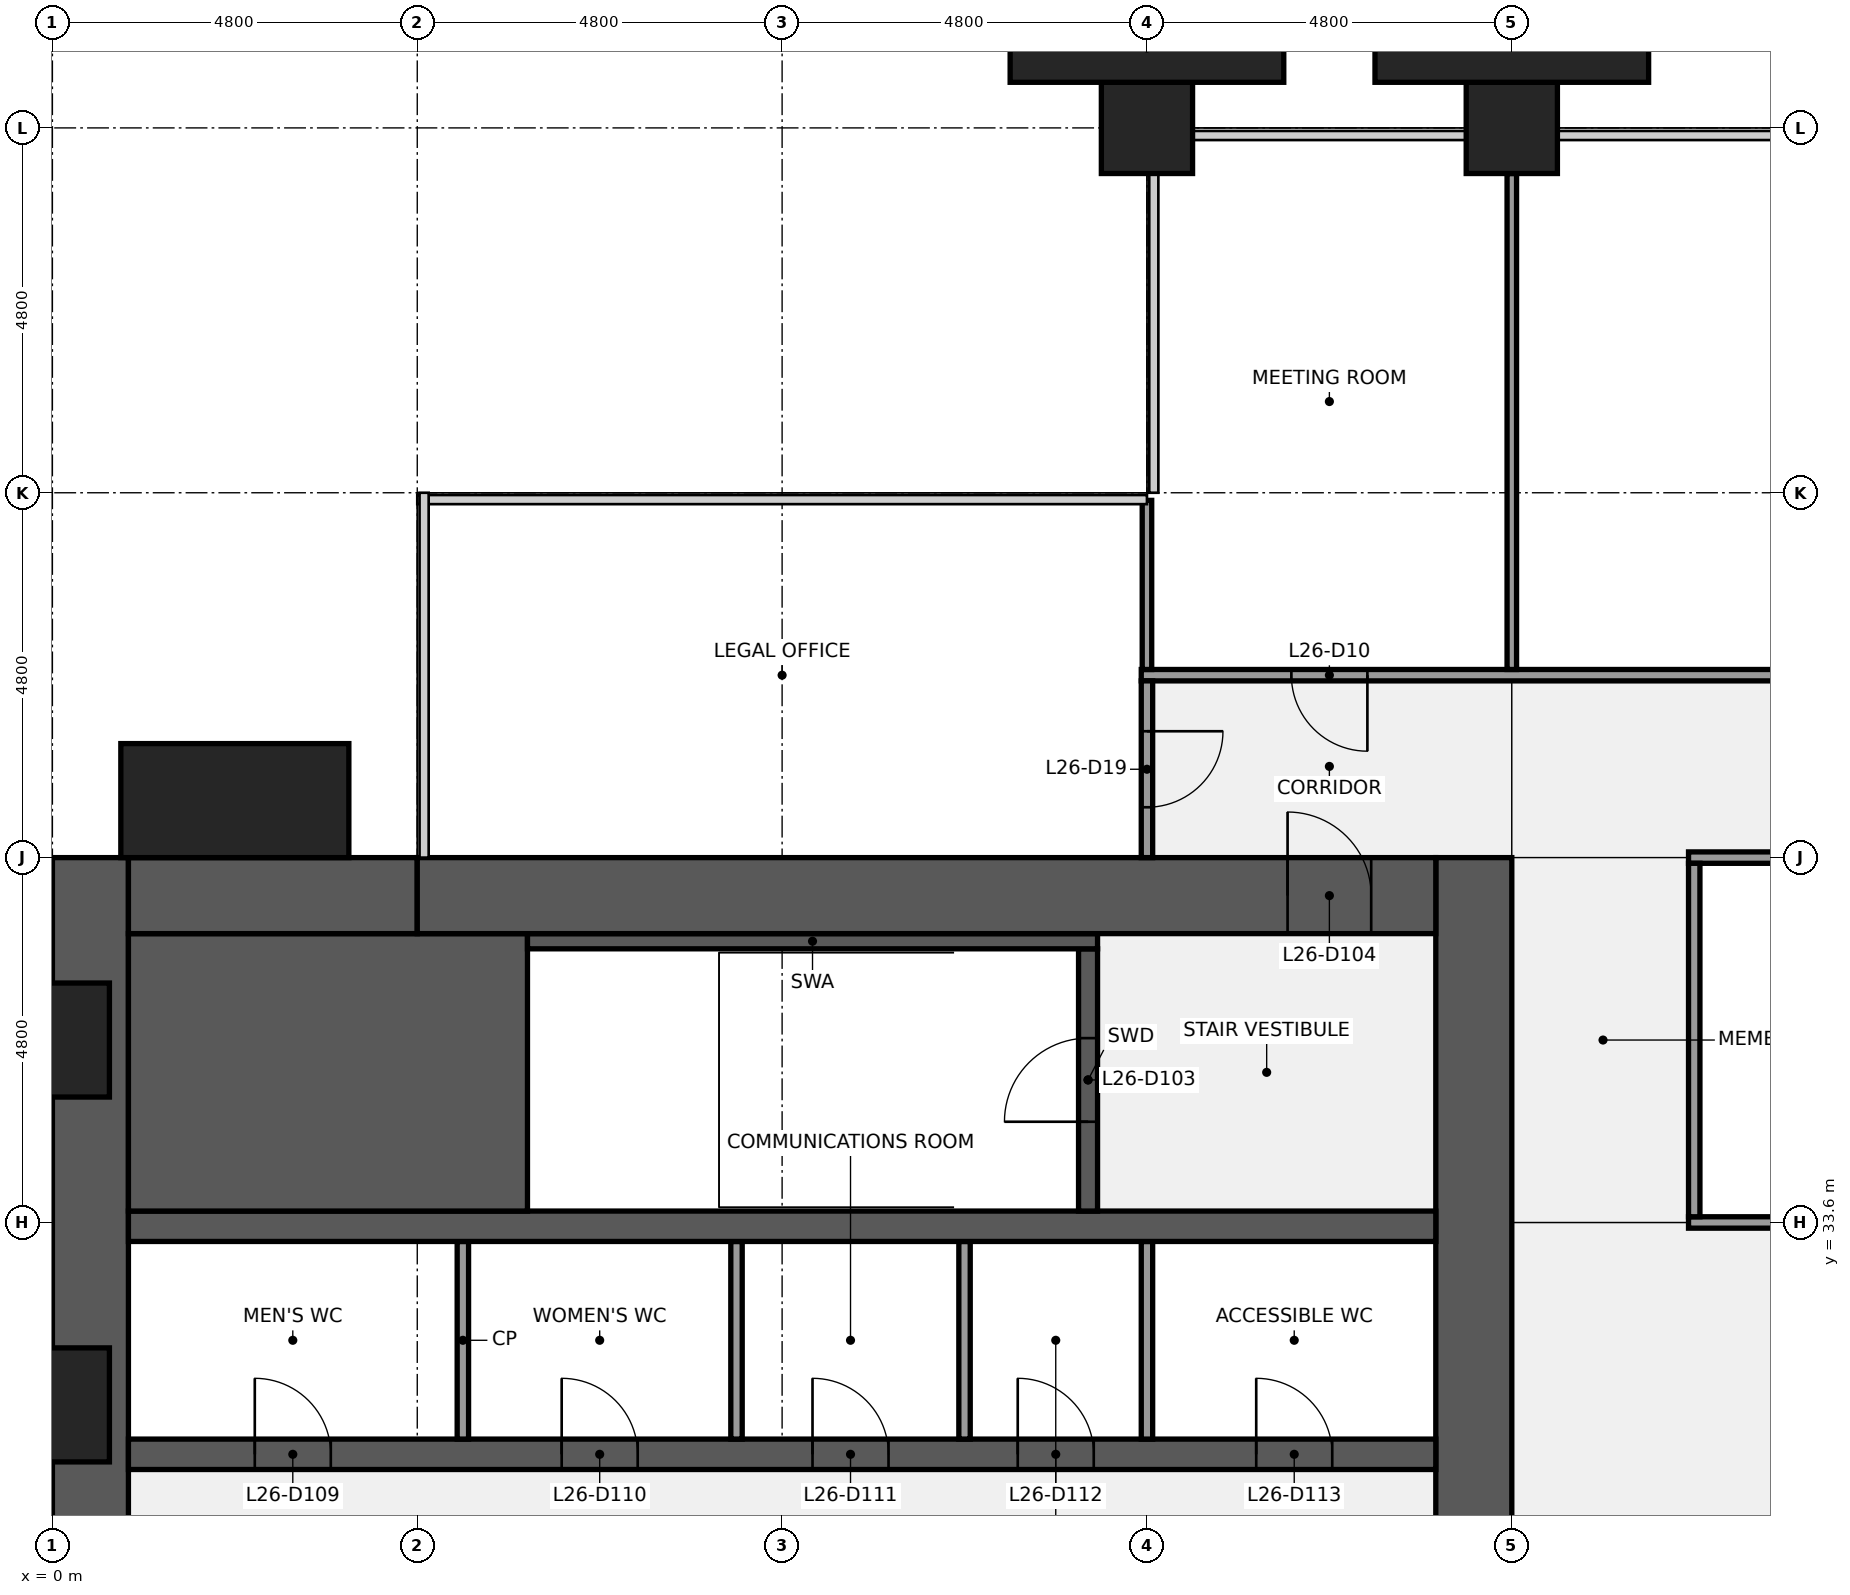
"""IFC4 building model, lengths in metres.
Left out: names, types, materials, properties, quantities, classifications, styles, units other than length and angle.
Written with IfcOpenShell. Run it as: python <this file> out.ifc"""

import sys

from ifc_helpers import new_model, si_unit, direction, frame, frame_2d, origin, origin_2d, place, context, subcontext, project, spatial, rectangle, extrude, element, fill, save


model = new_model("IFC4")
c1 = context("Model", 3, precision=1e-05, world=origin(), true_north=direction((0.0, 1.0)))
c2 = subcontext(c1, "Body", "Model", "MODEL_VIEW")
j1 = project(units=[si_unit("LENGTHUNIT", "METRE"), si_unit("PLANEANGLEUNIT", "RADIAN")], contexts=[c1])
p1 = place(None, origin())
s1 = spatial("IfcSite", under=j1, at=p1, CompositionType="ELEMENT")
p2 = place(p1, origin())
s2 = spatial("IfcBuilding", under=s1, at=p2, CompositionType="ELEMENT")
p3 = place(p2, frame((0.0, 0.0, 124.1)))
s3 = spatial("IfcBuildingStorey", under=s2, at=p3, CompositionType="ELEMENT", Elevation=124.1)
for number, where, z_axis, x_axis in (
    (1, (14.4, 48.0, 0.0), (0.0, 0.0, 1.0), (1.0, 0.0, 0.0)),
    (2, (19.2, 48.0, 0.0), (0.0, 0.0, 1.0), (1.0, 0.0, 0.0)),
):
    element("IfcColumn", number, at=place(p3, frame(where, z_axis=z_axis, x_axis=x_axis)), inside=s3, PredefinedType="COLUMN", context=c2, shape_type="SweptSolid", body=[
        extrude(rectangle(XDim=1.2, YDim=1.2, at=origin_2d()), origin(), (0.0, 0.0, 1.0), 4.0),
    ])
p4 = place(p3, frame((0.5, 9.6, 0.0), z_axis=(0.0, 0.0, 1.0), x_axis=(0.0, 1.0, 0.0)))
e3 = element("IfcWall", 3, at=p4, inside=s3, PredefinedType="SHEAR", context=c2, shape_type="SweptSolid", body=[
    extrude(rectangle(XDim=28.8, YDim=1.0, at=frame_2d((14.4, 0.0))), origin(), (0.0, 0.0, 1.0), 3.84),
])
p5 = place(p4, frame((8.85, 0.0, 0.9)))
e4 = element("IfcOpeningElement", 4, at=p5, cuts=e3, PredefinedType="OPENING", context=c2, shape_type="SweptSolid", body=[
    extrude(rectangle(XDim=1.5, YDim=1.5, at=frame_2d((0.75, 0.75))), frame((0.0, 0.51, 0.0), z_axis=(0.0, -1.0, 0.0), x_axis=(1.0, 0.0, 0.0)), (0.0, 0.0, 1.0), 1.02),
])
p6 = place(p4, frame((18.45, 0.0, 0.9)))
e5 = element("IfcOpeningElement", 5, at=p6, cuts=e3, PredefinedType="OPENING", context=c2, shape_type="SweptSolid", body=[
    extrude(rectangle(XDim=1.5, YDim=1.5, at=frame_2d((0.75, 0.75))), frame((0.0, 0.51, 0.0), z_axis=(0.0, -1.0, 0.0), x_axis=(1.0, 0.0, 0.0)), (0.0, 0.0, 1.0), 1.02),
])
p7 = place(p3, frame((18.7, 38.4, 0.0), z_axis=(0.0, 0.0, 1.0), x_axis=(0.0, -1.0, 0.0)))
e6 = element("IfcWall", 6, at=p7, inside=s3, PredefinedType="SHEAR", context=c2, shape_type="SweptSolid", body=[
    extrude(rectangle(XDim=28.8, YDim=1.0, at=frame_2d((14.4, 0.0))), origin(), (0.0, 0.0, 1.0), 3.84),
])
p8 = place(p7, frame((18.3, 0.0, 0.0)))
e7 = element("IfcOpeningElement", 7, at=p8, cuts=e6, PredefinedType="OPENING", context=c2, shape_type="SweptSolid", body=[
    extrude(rectangle(XDim=1.8, YDim=2.1, at=frame_2d((0.9, 1.05))), frame((0.0, 0.51, 0.0), z_axis=(0.0, -1.0, 0.0), x_axis=(1.0, 0.0, 0.0)), (0.0, 0.0, 1.0), 1.02),
])
p9 = place(p7, frame((8.7, 0.0, 0.0)))
e8 = element("IfcOpeningElement", 8, at=p9, cuts=e6, PredefinedType="OPENING", context=c2, shape_type="SweptSolid", body=[
    extrude(rectangle(XDim=1.8, YDim=2.1, at=frame_2d((0.9, 1.05))), frame((0.0, 0.51, 0.0), z_axis=(0.0, -1.0, 0.0), x_axis=(1.0, 0.0, 0.0)), (0.0, 0.0, 1.0), 1.02),
])
p10 = place(p3, frame((1.0, 30.55, 0.0), z_axis=(0.0, 0.0, 1.0), x_axis=(1.0, 0.0, 0.0)))
e9 = element("IfcWall", 9, at=p10, inside=s3, PredefinedType="SHEAR", context=c2, shape_type="SweptSolid", body=[
    extrude(rectangle(XDim=17.2, YDim=0.4, at=frame_2d((8.6, 0.0))), origin(), (0.0, 0.0, 1.0), 3.84),
])
p11 = place(p10, frame((1.663, 0.0, 0.0)))
e10 = element("IfcOpeningElement", 10, at=p11, cuts=e9, PredefinedType="OPENING", context=c2, shape_type="SweptSolid", body=[
    extrude(rectangle(XDim=1.0, YDim=2.1, at=frame_2d((0.5, 1.05))), frame((0.0, 0.21, 0.0), z_axis=(0.0, -1.0, 0.0), x_axis=(1.0, 0.0, 0.0)), (0.0, 0.0, 1.0), 0.42),
])
p12 = place(p10, frame((5.7, 0.0, 0.0)))
e11 = element("IfcOpeningElement", 11, at=p12, cuts=e9, PredefinedType="OPENING", context=c2, shape_type="SweptSolid", body=[
    extrude(rectangle(XDim=1.0, YDim=2.1, at=frame_2d((0.5, 1.05))), frame((0.0, 0.21, 0.0), z_axis=(0.0, -1.0, 0.0), x_axis=(1.0, 0.0, 0.0)), (0.0, 0.0, 1.0), 0.42),
])
p13 = place(p10, frame((9.0, 0.0, 0.0)))
e12 = element("IfcOpeningElement", 12, at=p13, cuts=e9, PredefinedType="OPENING", context=c2, shape_type="SweptSolid", body=[
    extrude(rectangle(XDim=1.0, YDim=2.1, at=frame_2d((0.5, 1.05))), frame((0.0, 0.21, 0.0), z_axis=(0.0, -1.0, 0.0), x_axis=(1.0, 0.0, 0.0)), (0.0, 0.0, 1.0), 0.42),
])
p14 = place(p10, frame((11.7, 0.0, 0.0)))
e13 = element("IfcOpeningElement", 13, at=p14, cuts=e9, PredefinedType="OPENING", context=c2, shape_type="SweptSolid", body=[
    extrude(rectangle(XDim=1.0, YDim=2.1, at=frame_2d((0.5, 1.05))), frame((0.0, 0.21, 0.0), z_axis=(0.0, -1.0, 0.0), x_axis=(1.0, 0.0, 0.0)), (0.0, 0.0, 1.0), 0.42),
])
p15 = place(p10, frame((14.837, 0.0, 0.0)))
e14 = element("IfcOpeningElement", 14, at=p15, cuts=e9, PredefinedType="OPENING", context=c2, shape_type="SweptSolid", body=[
    extrude(rectangle(XDim=1.0, YDim=2.1, at=frame_2d((0.5, 1.05))), frame((0.0, 0.21, 0.0), z_axis=(0.0, -1.0, 0.0), x_axis=(1.0, 0.0, 0.0)), (0.0, 0.0, 1.0), 0.42),
])
for number, where, z_axis, x_axis in (
    (15, (5.4, 30.75, 0.0), (0.0, 0.0, 1.0), (0.0, 1.0, 0.0)),
    (16, (9.0, 30.75, 0.0), (0.0, 0.0, 1.0), (0.0, 1.0, 0.0)),
    (17, (12.0, 30.75, 0.0), (0.0, 0.0, 1.0), (0.0, 1.0, 0.0)),
    (18, (14.4, 30.75, 0.0), (0.0, 0.0, 1.0), (0.0, 1.0, 0.0)),
):
    element("IfcWall", number, at=place(p3, frame(where, z_axis=z_axis, x_axis=x_axis)), inside=s3, PredefinedType="PARTITIONING", context=c2, shape_type="SweptSolid", body=[
        extrude(rectangle(XDim=2.6, YDim=0.15, at=frame_2d((1.3, 0.0))), origin(), (0.0, 0.0, 1.0), 3.84),
    ])
p16 = place(p3, frame((1.0, 33.55, 0.0), z_axis=(0.0, 0.0, 1.0), x_axis=(1.0, 0.0, 0.0)))
e19 = element("IfcWall", 19, at=p16, inside=s3, PredefinedType="SHEAR", context=c2, shape_type="SweptSolid", body=[
    extrude(rectangle(XDim=17.2, YDim=0.4, at=frame_2d((8.6, 0.0))), origin(), (0.0, 0.0, 1.0), 3.84),
])
p17 = place(p3, frame((1.0, 35.575, 0.0), z_axis=(0.0, 0.0, 1.0), x_axis=(1.0, 0.0, 0.0)))
e20 = element("IfcWall", 20, at=p17, inside=s3, PredefinedType="SHEAR", context=c2, shape_type="SweptSolid", body=[
    extrude(rectangle(XDim=5.25, YDim=3.65, at=frame_2d((2.625, 0.0))), origin(), (0.0, 0.0, 1.0), 3.84),
])
p18 = place(p3, frame((13.625, 33.75, 0.0), z_axis=(0.0, 0.0, 1.0), x_axis=(0.0, 1.0, 0.0)))
e21 = element("IfcWall", 21, at=p18, inside=s3, PredefinedType="SHEAR", context=c2, shape_type="SweptSolid", body=[
    extrude(rectangle(XDim=3.45, YDim=0.25, at=frame_2d((1.725, 0.0))), origin(), (0.0, 0.0, 1.0), 3.84),
])
p19 = place(p18, frame((1.175, 0.0, 0.0)))
e22 = element("IfcOpeningElement", 22, at=p19, cuts=e21, PredefinedType="OPENING", context=c2, shape_type="SweptSolid", body=[
    extrude(rectangle(XDim=1.1, YDim=2.1, at=frame_2d((0.55, 1.05))), frame((0.0, 0.135, 0.0), z_axis=(0.0, -1.0, 0.0), x_axis=(1.0, 0.0, 0.0)), (0.0, 0.0, 1.0), 0.27),
])
p20 = place(p3, frame((6.25, 37.3, 0.0), z_axis=(0.0, 0.0, 1.0), x_axis=(1.0, 0.0, 0.0)))
e23 = element("IfcWall", 23, at=p20, inside=s3, PredefinedType="SHEAR", context=c2, shape_type="SweptSolid", body=[
    extrude(rectangle(XDim=7.5, YDim=0.2, at=frame_2d((3.75, 0.0))), origin(), (0.0, 0.0, 1.0), 3.84),
])
p21 = place(p3, frame((1.0, 37.9, 0.0), z_axis=(0.0, 0.0, 1.0), x_axis=(1.0, 0.0, 0.0)))
e24 = element("IfcWall", 24, at=p21, inside=s3, PredefinedType="SHEAR", context=c2, shape_type="SweptSolid", body=[
    extrude(rectangle(XDim=3.8, YDim=1.0, at=frame_2d((1.9, 0.0))), origin(), (0.0, 0.0, 1.0), 3.84),
])
p22 = place(p3, frame((4.8, 37.9, 0.0), z_axis=(0.0, 0.0, 1.0), x_axis=(1.0, 0.0, 0.0)))
e25 = element("IfcWall", 25, at=p22, inside=s3, PredefinedType="SHEAR", context=c2, shape_type="SweptSolid", body=[
    extrude(rectangle(XDim=13.4, YDim=1.0, at=frame_2d((6.7, 0.0))), origin(), (0.0, 0.0, 1.0), 3.84),
])
p23 = place(p22, frame((11.45, 0.0, 0.0)))
e26 = element("IfcOpeningElement", 26, at=p23, cuts=e25, PredefinedType="OPENING", context=c2, shape_type="SweptSolid", body=[
    extrude(rectangle(XDim=1.1, YDim=2.1, at=frame_2d((0.55, 1.05))), frame((0.0, 0.51, 0.0), z_axis=(0.0, -1.0, 0.0), x_axis=(1.0, 0.0, 0.0)), (0.0, 0.0, 1.0), 1.02),
])
p24 = place(p3, frame((21.525, 33.6, 0.0), z_axis=(0.0, 0.0, 1.0), x_axis=(1.0, 0.0, 0.0)))
e27 = element("IfcWall", 27, at=p24, inside=s3, PredefinedType="PARTITIONING", context=c2, shape_type="SweptSolid", body=[
    extrude(rectangle(XDim=2.55, YDim=0.15, at=frame_2d((1.275, 0.0))), origin(), (0.0, 0.0, 1.0), 2.849),
])
p25 = place(p3, frame((21.525, 38.4, 0.0), z_axis=(0.0, 0.0, 1.0), x_axis=(1.0, 0.0, 0.0)))
e28 = element("IfcWall", 28, at=p25, inside=s3, PredefinedType="PARTITIONING", context=c2, shape_type="SweptSolid", body=[
    extrude(rectangle(XDim=14.55, YDim=0.15, at=frame_2d((7.275, 0.0))), origin(), (0.0, 0.0, 1.0), 2.849),
])
p26 = place(p25, frame((3.175, 0.0, 0.0)))
e29 = element("IfcOpeningElement", 29, at=p26, cuts=e28, PredefinedType="OPENING", context=c2, shape_type="SweptSolid", body=[
    extrude(rectangle(XDim=1.0, YDim=2.1, at=frame_2d((0.5, 1.05))), frame((0.0, 0.085, 0.0), z_axis=(0.0, -1.0, 0.0), x_axis=(1.0, 0.0, 0.0)), (0.0, 0.0, 1.0), 0.17),
])
p27 = place(p25, frame((10.375, 0.0, 0.0)))
e30 = element("IfcOpeningElement", 30, at=p27, cuts=e28, PredefinedType="OPENING", context=c2, shape_type="SweptSolid", body=[
    extrude(rectangle(XDim=1.0, YDim=2.1, at=frame_2d((0.5, 1.05))), frame((0.0, 0.085, 0.0), z_axis=(0.0, -1.0, 0.0), x_axis=(1.0, 0.0, 0.0)), (0.0, 0.0, 1.0), 0.17),
])
p28 = place(p3, frame((14.325, 40.8, 0.0), z_axis=(0.0, 0.0, 1.0), x_axis=(1.0, 0.0, 0.0)))
e31 = element("IfcWall", 31, at=p28, inside=s3, PredefinedType="PARTITIONING", context=c2, shape_type="SweptSolid", body=[
    extrude(rectangle(XDim=28.95, YDim=0.15, at=frame_2d((14.475, 0.0))), origin(), (0.0, 0.0, 1.0), 2.849),
])
p29 = place(p28, frame((1.975, 0.0, 0.0)))
e32 = element("IfcOpeningElement", 32, at=p29, cuts=e31, PredefinedType="OPENING", context=c2, shape_type="SweptSolid", body=[
    extrude(rectangle(XDim=1.0, YDim=2.1, at=frame_2d((0.5, 1.05))), frame((0.0, 0.085, 0.0), z_axis=(0.0, -1.0, 0.0), x_axis=(1.0, 0.0, 0.0)), (0.0, 0.0, 1.0), 0.17),
])
p30 = place(p28, frame((9.175, 0.0, 0.0)))
e33 = element("IfcOpeningElement", 33, at=p30, cuts=e31, PredefinedType="OPENING", context=c2, shape_type="SweptSolid", body=[
    extrude(rectangle(XDim=1.0, YDim=2.1, at=frame_2d((0.5, 1.05))), frame((0.0, 0.085, 0.0), z_axis=(0.0, -1.0, 0.0), x_axis=(1.0, 0.0, 0.0)), (0.0, 0.0, 1.0), 0.17),
])
p31 = place(p28, frame((15.175, 0.0, 0.0)))
e34 = element("IfcOpeningElement", 34, at=p31, cuts=e31, PredefinedType="OPENING", context=c2, shape_type="SweptSolid", body=[
    extrude(rectangle(XDim=1.0, YDim=2.1, at=frame_2d((0.5, 1.05))), frame((0.0, 0.085, 0.0), z_axis=(0.0, -1.0, 0.0), x_axis=(1.0, 0.0, 0.0)), (0.0, 0.0, 1.0), 0.17),
])
p32 = place(p28, frame((19.975, 0.0, 0.0)))
e35 = element("IfcOpeningElement", 35, at=p32, cuts=e31, PredefinedType="OPENING", context=c2, shape_type="SweptSolid", body=[
    extrude(rectangle(XDim=1.0, YDim=2.1, at=frame_2d((0.5, 1.05))), frame((0.0, 0.085, 0.0), z_axis=(0.0, -1.0, 0.0), x_axis=(1.0, 0.0, 0.0)), (0.0, 0.0, 1.0), 0.17),
])
p33 = place(p28, frame((25.975, 0.0, 0.0)))
e36 = element("IfcOpeningElement", 36, at=p33, cuts=e31, PredefinedType="OPENING", context=c2, shape_type="SweptSolid", body=[
    extrude(rectangle(XDim=1.0, YDim=2.1, at=frame_2d((0.5, 1.05))), frame((0.0, 0.085, 0.0), z_axis=(0.0, -1.0, 0.0), x_axis=(1.0, 0.0, 0.0)), (0.0, 0.0, 1.0), 0.17),
])
p34 = place(p3, frame((14.4, 40.875, 0.0), z_axis=(0.0, 0.0, 1.0), x_axis=(0.0, 1.0, 0.0)))
e37 = element("IfcWall", 37, at=p34, inside=s3, PredefinedType="PARTITIONING", context=c2, shape_type="SweptSolid", body=[
    extrude(rectangle(XDim=2.225, YDim=0.125, at=frame_2d((1.113, 0.0))), origin(), (0.0, 0.0, 1.0), 2.849),
])
p35 = place(p3, frame((14.4, 38.4, 0.0), z_axis=(0.0, 0.0, 1.0), x_axis=(0.0, 1.0, 0.0)))
e38 = element("IfcWall", 38, at=p35, inside=s3, PredefinedType="PARTITIONING", context=c2, shape_type="SweptSolid", body=[
    extrude(rectangle(XDim=2.325, YDim=0.15, at=frame_2d((1.163, 0.0))), origin(), (0.0, 0.0, 1.0), 2.849),
])
p36 = place(p35, frame((0.663, 0.0, 0.0)))
e39 = element("IfcOpeningElement", 39, at=p36, cuts=e38, PredefinedType="OPENING", context=c2, shape_type="SweptSolid", body=[
    extrude(rectangle(XDim=1.0, YDim=2.1, at=frame_2d((0.5, 1.05))), frame((0.0, 0.085, 0.0), z_axis=(0.0, -1.0, 0.0), x_axis=(1.0, 0.0, 0.0)), (0.0, 0.0, 1.0), 0.17),
])
p37 = place(p3, frame((19.2, 40.875, 0.0), z_axis=(0.0, 0.0, 1.0), x_axis=(0.0, 1.0, 0.0)))
e40 = element("IfcWall", 40, at=p37, inside=s3, PredefinedType="PARTITIONING", context=c2, shape_type="SweptSolid", body=[
    extrude(rectangle(XDim=6.525, YDim=0.125, at=frame_2d((3.262, 0.0))), origin(), (0.0, 0.0, 1.0), 2.849),
])
p38 = place(p3, frame((21.6, 33.675, 0.0), z_axis=(0.0, 0.0, 1.0), x_axis=(0.0, 1.0, 0.0)))
e41 = element("IfcWall", 41, at=p38, inside=s3, PredefinedType="PARTITIONING", context=c2, shape_type="SweptSolid", body=[
    extrude(rectangle(XDim=4.65, YDim=0.15, at=frame_2d((2.325, 0.0))), origin(), (0.0, 0.0, 1.0), 2.849),
])
p39 = place(p3, frame((2.4, 39.15, 0.0), z_axis=(0.0, 0.0, 1.0), x_axis=(1.0, 0.0, 0.0)))
e42 = element("IfcColumn", 42, at=p39, inside=s3, PredefinedType="PILASTER", context=c2, shape_type="SweptSolid", body=[
    extrude(rectangle(XDim=3.0, YDim=1.5, at=origin_2d()), origin(), (0.0, 0.0, 1.0), 4.0),
])
for number, where, z_axis, x_axis in (
    (43, (14.4, 49.05, 0.0), (0.0, 0.0, 1.0), (1.0, 0.0, 0.0)),
    (44, (19.2, 49.05, 0.0), (0.0, 0.0, 1.0), (1.0, 0.0, 0.0)),
):
    element("IfcColumn", number, at=place(p3, frame(where, z_axis=z_axis, x_axis=x_axis)), inside=s3, PredefinedType="PILASTER", context=c2, shape_type="SweptSolid", body=[
        extrude(rectangle(XDim=3.6, YDim=0.9, at=origin_2d()), origin(), (0.0, 0.0, 1.0), 4.0),
    ])
p40 = place(p19, origin())
e45 = element("IfcDoor", 45, at=p40, inside=s3, OperationType="SINGLE_SWING_LEFT", PredefinedType="DOOR", context=c2, shape_type="SweptSolid", body=[
    extrude(rectangle(XDim=1.1, YDim=2.1, at=frame_2d((0.55, 1.05))), frame((0.0, 0.025, 0.0), z_axis=(0.0, -1.0, 0.0), x_axis=(1.0, 0.0, 0.0)), (0.0, 0.0, 1.0), 0.05),
])
fill(e22, e45)
p41 = place(p23, origin())
e46 = element("IfcDoor", 46, at=p41, inside=s3, OperationType="SINGLE_SWING_LEFT", PredefinedType="DOOR", context=c2, shape_type="SweptSolid", body=[
    extrude(rectangle(XDim=1.1, YDim=2.1, at=frame_2d((0.55, 1.05))), frame((0.0, 0.025, 0.0), z_axis=(0.0, -1.0, 0.0), x_axis=(1.0, 0.0, 0.0)), (0.0, 0.0, 1.0), 0.05),
])
fill(e26, e46)
p42 = place(p11, origin())
e47 = element("IfcDoor", 47, at=p42, inside=s3, OperationType="SINGLE_SWING_LEFT", PredefinedType="DOOR", context=c2, shape_type="SweptSolid", body=[
    extrude(rectangle(XDim=1.0, YDim=2.1, at=frame_2d((0.5, 1.05))), frame((0.0, 0.025, 0.0), z_axis=(0.0, -1.0, 0.0), x_axis=(1.0, 0.0, 0.0)), (0.0, 0.0, 1.0), 0.05),
])
fill(e10, e47)
p43 = place(p12, origin())
e48 = element("IfcDoor", 48, at=p43, inside=s3, OperationType="SINGLE_SWING_LEFT", PredefinedType="DOOR", context=c2, shape_type="SweptSolid", body=[
    extrude(rectangle(XDim=1.0, YDim=2.1, at=frame_2d((0.5, 1.05))), frame((0.0, 0.025, 0.0), z_axis=(0.0, -1.0, 0.0), x_axis=(1.0, 0.0, 0.0)), (0.0, 0.0, 1.0), 0.05),
])
fill(e11, e48)
p44 = place(p13, origin())
e49 = element("IfcDoor", 49, at=p44, inside=s3, OperationType="SINGLE_SWING_LEFT", PredefinedType="DOOR", context=c2, shape_type="SweptSolid", body=[
    extrude(rectangle(XDim=1.0, YDim=2.1, at=frame_2d((0.5, 1.05))), frame((0.0, 0.025, 0.0), z_axis=(0.0, -1.0, 0.0), x_axis=(1.0, 0.0, 0.0)), (0.0, 0.0, 1.0), 0.05),
])
fill(e12, e49)
p45 = place(p14, origin())
e50 = element("IfcDoor", 50, at=p45, inside=s3, OperationType="SINGLE_SWING_LEFT", PredefinedType="DOOR", context=c2, shape_type="SweptSolid", body=[
    extrude(rectangle(XDim=1.0, YDim=2.1, at=frame_2d((0.5, 1.05))), frame((0.0, 0.025, 0.0), z_axis=(0.0, -1.0, 0.0), x_axis=(1.0, 0.0, 0.0)), (0.0, 0.0, 1.0), 0.05),
])
fill(e13, e50)
p46 = place(p15, origin())
e51 = element("IfcDoor", 51, at=p46, inside=s3, OperationType="SINGLE_SWING_LEFT", PredefinedType="DOOR", context=c2, shape_type="SweptSolid", body=[
    extrude(rectangle(XDim=1.0, YDim=2.1, at=frame_2d((0.5, 1.05))), frame((0.0, 0.025, 0.0), z_axis=(0.0, -1.0, 0.0), x_axis=(1.0, 0.0, 0.0)), (0.0, 0.0, 1.0), 0.05),
])
fill(e14, e51)
p47 = place(p29, origin())
e52 = element("IfcDoor", 52, at=p47, inside=s3, OperationType="SINGLE_SWING_RIGHT", PredefinedType="DOOR", context=c2, shape_type="SweptSolid", body=[
    extrude(rectangle(XDim=1.0, YDim=2.1, at=frame_2d((0.5, 1.05))), frame((0.0, 0.025, 0.0), z_axis=(0.0, -1.0, 0.0), x_axis=(1.0, 0.0, 0.0)), (0.0, 0.0, 1.0), 0.05),
])
fill(e32, e52)
p48 = place(p36, origin())
e53 = element("IfcDoor", 53, at=p48, inside=s3, OperationType="SINGLE_SWING_RIGHT", PredefinedType="DOOR", context=c2, shape_type="SweptSolid", body=[
    extrude(rectangle(XDim=1.0, YDim=2.1, at=frame_2d((0.5, 1.05))), frame((0.0, 0.025, 0.0), z_axis=(0.0, -1.0, 0.0), x_axis=(1.0, 0.0, 0.0)), (0.0, 0.0, 1.0), 0.05),
])
fill(e39, e53)
save(model, sys.argv[1])
